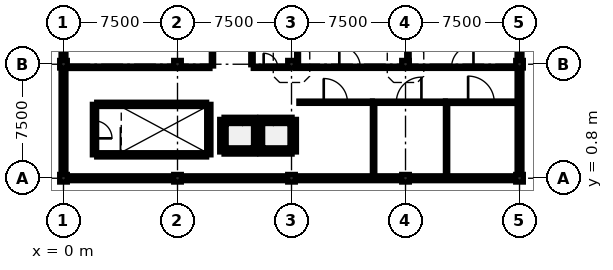
"""IFC4 building model, lengths in metres.
Left out: names, types, materials, properties, quantities, classifications, styles, units other than length and angle.
Written with IfcOpenShell. Run it as: python <this file> out.ifc"""

import sys

from ifc_helpers import new_model, si_unit, direction, frame, frame_2d, origin, origin_2d, place, context, subcontext, project, spatial, rectangle, extrude, element, fill, save


model = new_model("IFC4")
c1 = context("Model", 3, precision=1e-05, world=origin(), true_north=direction((0.0, 1.0)))
c2 = subcontext(c1, "Body", "Model", "MODEL_VIEW")
j1 = project(units=[si_unit("LENGTHUNIT", "METRE"), si_unit("PLANEANGLEUNIT", "RADIAN")], contexts=[c1])
p1 = place(None, origin())
s1 = spatial("IfcSite", under=j1, at=p1, CompositionType="ELEMENT")
p2 = place(p1, origin())
s2 = spatial("IfcBuilding", under=s1, at=p2, CompositionType="ELEMENT")
p3 = place(p2, frame((0.0, 0.0, 21.5)))
s3 = spatial("IfcBuildingStorey", under=s2, at=p3, CompositionType="ELEMENT", Elevation=21.5)
for number, where, z_axis, x_axis in (
    (1, (0.0, 0.8, 0.0), (0.0, 0.0, 1.0), (1.0, 0.0, 0.0)),
    (2, (0.0, 8.3, 0.0), (0.0, 0.0, 1.0), (1.0, 0.0, 0.0)),
):
    element("IfcColumn", number, at=place(p3, frame(where, z_axis=z_axis, x_axis=x_axis)), inside=s3, PredefinedType="COLUMN", context=c2, shape_type="SweptSolid", body=[
        extrude(rectangle(XDim=0.5, YDim=0.5, at=origin_2d()), origin(), (0.0, 0.0, 1.0), 3.83),
    ])
for number, where, z_axis, x_axis in (
    (3, (7.5, 0.8, 0.0), (0.0, 0.0, 1.0), (1.0, 0.0, 0.0)),
    (4, (7.5, 8.3, 0.0), (0.0, 0.0, 1.0), (1.0, 0.0, 0.0)),
):
    element("IfcColumn", number, at=place(p3, frame(where, z_axis=z_axis, x_axis=x_axis)), inside=s3, PredefinedType="COLUMN", context=c2, shape_type="SweptSolid", body=[
        extrude(rectangle(XDim=0.5, YDim=0.5, at=origin_2d()), origin(), (0.0, 0.0, 1.0), 4.08),
    ])
for number, where, z_axis, x_axis in (
    (5, (15.0, 0.8, 0.0), (0.0, 0.0, 1.0), (1.0, 0.0, 0.0)),
    (6, (15.0, 8.3, 0.0), (0.0, 0.0, 1.0), (1.0, 0.0, 0.0)),
):
    element("IfcColumn", number, at=place(p3, frame(where, z_axis=z_axis, x_axis=x_axis)), inside=s3, PredefinedType="COLUMN", context=c2, shape_type="SweptSolid", body=[
        extrude(rectangle(XDim=0.5, YDim=0.5, at=origin_2d()), origin(), (0.0, 0.0, 1.0), 4.33),
    ])
for number, where, z_axis, x_axis in (
    (7, (22.5, 0.8, 0.0), (0.0, 0.0, 1.0), (1.0, 0.0, 0.0)),
    (8, (22.5, 8.3, 0.0), (0.0, 0.0, 1.0), (1.0, 0.0, 0.0)),
):
    element("IfcColumn", number, at=place(p3, frame(where, z_axis=z_axis, x_axis=x_axis)), inside=s3, PredefinedType="COLUMN", context=c2, shape_type="SweptSolid", body=[
        extrude(rectangle(XDim=0.5, YDim=0.5, at=origin_2d()), origin(), (0.0, 0.0, 1.0), 4.58),
    ])
for number, where, z_axis, x_axis in (
    (9, (30.0, 0.8, 0.0), (0.0, 0.0, 1.0), (1.0, 0.0, 0.0)),
    (10, (30.0, 8.3, 0.0), (0.0, 0.0, 1.0), (1.0, 0.0, 0.0)),
):
    element("IfcColumn", number, at=place(p3, frame(where, z_axis=z_axis, x_axis=x_axis)), inside=s3, PredefinedType="COLUMN", context=c2, shape_type="SweptSolid", body=[
        extrude(rectangle(XDim=0.5, YDim=0.5, at=origin_2d()), origin(), (0.0, 0.0, 1.0), 4.83),
    ])
p4 = place(p3, frame((30.0, 15.55, 0.0), z_axis=(0.0, 0.0, 1.0), x_axis=(0.0, -1.0, 0.0)))
e11 = element("IfcWall", 11, at=p4, inside=s3, PredefinedType="SOLIDWALL", context=c2, shape_type="SweptSolid", body=[
    extrude(rectangle(XDim=7.0, YDim=0.32, at=frame_2d((3.5, 0.0))), origin(), (0.0, 0.0, 1.0), 3.7),
])
p5 = place(p4, frame((2.8, 0.0, 0.9)))
e12 = element("IfcOpeningElement", 12, at=p5, cuts=e11, PredefinedType="OPENING", context=c2, shape_type="SweptSolid", body=[
    extrude(rectangle(XDim=1.4, YDim=1.5, at=frame_2d((0.7, 0.75))), frame((0.0, 0.172, 0.0), z_axis=(0.0, -1.0, 0.0), x_axis=(1.0, 0.0, 0.0)), (0.0, 0.0, 1.0), 0.344),
])
for number, where, z_axis, x_axis in (
    (13, (30.0, 8.05, 0.0), (0.0, 0.0, 1.0), (0.0, -1.0, 0.0)),
    (14, (29.75, 0.8, 0.0), (0.0, 0.0, 1.0), (-1.0, 0.0, 0.0)),
    (15, (22.25, 0.8, 0.0), (0.0, 0.0, 1.0), (-1.0, 0.0, 0.0)),
):
    element("IfcWall", number, at=place(p3, frame(where, z_axis=z_axis, x_axis=x_axis)), inside=s3, PredefinedType="SOLIDWALL", context=c2, shape_type="SweptSolid", body=[
        extrude(rectangle(XDim=7.0, YDim=0.32, at=frame_2d((3.5, 0.0))), origin(), (0.0, 0.0, 1.0), 3.7),
    ])
p6 = place(p3, frame((14.75, 0.8, 0.0), z_axis=(0.0, 0.0, 1.0), x_axis=(-1.0, 0.0, 0.0)))
e16 = element("IfcWall", 16, at=p6, inside=s3, PredefinedType="SOLIDWALL", context=c2, shape_type="SweptSolid", body=[
    extrude(rectangle(XDim=7.0, YDim=0.32, at=frame_2d((3.5, 0.0))), origin(), (0.0, 0.0, 1.0), 3.7),
])
p7 = place(p6, frame((2.8, 0.0, 0.9)))
e17 = element("IfcOpeningElement", 17, at=p7, cuts=e16, PredefinedType="OPENING", context=c2, shape_type="SweptSolid", body=[
    extrude(rectangle(XDim=1.4, YDim=1.7, at=frame_2d((0.7, 0.85))), frame((0.0, 0.172, 0.0), z_axis=(0.0, -1.0, 0.0), x_axis=(1.0, 0.0, 0.0)), (0.0, 0.0, 1.0), 0.344),
])
p8 = place(p3, frame((7.25, 0.8, 0.0), z_axis=(0.0, 0.0, 1.0), x_axis=(-1.0, 0.0, 0.0)))
e18 = element("IfcWall", 18, at=p8, inside=s3, PredefinedType="SOLIDWALL", context=c2, shape_type="SweptSolid", body=[
    extrude(rectangle(XDim=7.0, YDim=0.32, at=frame_2d((3.5, 0.0))), origin(), (0.0, 0.0, 1.0), 3.7),
])
p9 = place(p8, frame((2.8, 0.0, 0.9)))
e19 = element("IfcOpeningElement", 19, at=p9, cuts=e18, PredefinedType="OPENING", context=c2, shape_type="SweptSolid", body=[
    extrude(rectangle(XDim=1.4, YDim=1.9, at=frame_2d((0.7, 0.95))), frame((0.0, 0.172, 0.0), z_axis=(0.0, -1.0, 0.0), x_axis=(1.0, 0.0, 0.0)), (0.0, 0.0, 1.0), 0.344),
])
for number, where, z_axis, x_axis in (
    (20, (0.0, 1.05, 0.0), (0.0, 0.0, 1.0), (0.0, 1.0, 0.0)),
    (21, (0.0, 8.55, 0.0), (0.0, 0.0, 1.0), (0.0, 1.0, 0.0)),
):
    element("IfcWall", number, at=place(p3, frame(where, z_axis=z_axis, x_axis=x_axis)), inside=s3, PredefinedType="SOLIDWALL", context=c2, shape_type="SweptSolid", body=[
        extrude(rectangle(XDim=7.0, YDim=0.32, at=frame_2d((3.5, 0.0))), origin(), (0.0, 0.0, 1.0), 3.7),
    ])
p10 = place(p3, frame((2.185, 2.34, 0.0), z_axis=(0.0, 0.0, 1.0), x_axis=(1.0, 0.0, 0.0)))
e22 = element("IfcWall", 22, at=p10, inside=s3, PredefinedType="SHEAR", context=c2, shape_type="SweptSolid", body=[
    extrude(rectangle(XDim=7.23, YDim=0.28, at=frame_2d((3.615, 0.0))), origin(), (0.0, 0.0, 1.0), 3.72),
])
p11 = place(p3, frame((9.56, 2.34, 0.0), z_axis=(0.0, 0.0, 1.0), x_axis=(0.0, 1.0, 0.0)))
e23 = element("IfcWall", 23, at=p11, inside=s3, PredefinedType="SHEAR", context=c2, shape_type="SweptSolid", body=[
    extrude(rectangle(XDim=3.32, YDim=0.28, at=frame_2d((1.66, 0.0))), origin(), (0.0, 0.0, 1.0), 3.72),
])
p12 = place(p3, frame((9.415, 5.66, 0.0), z_axis=(0.0, 0.0, 1.0), x_axis=(-1.0, 0.0, 0.0)))
e24 = element("IfcWall", 24, at=p12, inside=s3, PredefinedType="SHEAR", context=c2, shape_type="SweptSolid", body=[
    extrude(rectangle(XDim=7.23, YDim=0.28, at=frame_2d((3.615, 0.0))), origin(), (0.0, 0.0, 1.0), 3.72),
])
p13 = place(p3, frame((2.04, 5.66, 0.0), z_axis=(0.0, 0.0, 1.0), x_axis=(0.0, -1.0, 0.0)))
e25 = element("IfcWall", 25, at=p13, inside=s3, PredefinedType="SHEAR", context=c2, shape_type="SweptSolid", body=[
    extrude(rectangle(XDim=3.32, YDim=0.28, at=frame_2d((1.66, 0.0))), origin(), (0.0, 0.0, 1.0), 3.72),
])
p14 = place(p13, frame((1.085, 0.0, 0.0)))
e26 = element("IfcOpeningElement", 26, at=p14, cuts=e25, PredefinedType="OPENING", context=c2, shape_type="SweptSolid", body=[
    extrude(rectangle(XDim=1.15, YDim=2.15, at=frame_2d((0.575, 1.075))), frame((0.0, 0.152, 0.0), z_axis=(0.0, -1.0, 0.0), x_axis=(1.0, 0.0, 0.0)), (0.0, 0.0, 1.0), 0.304),
])
p15 = place(p3, frame((10.562, 2.529, 0.0), z_axis=(0.0, 0.0, 1.0), x_axis=(1.0, 0.0, 0.0)))
e27 = element("IfcWall", 27, at=p15, inside=s3, PredefinedType="SHEAR", context=c2, shape_type="SweptSolid", body=[
    extrude(rectangle(XDim=2.077, YDim=0.28, at=frame_2d((1.039, 0.0))), origin(), (0.0, 0.0, 1.0), 5.3),
])
p16 = place(p3, frame((12.783, 2.529, 0.0), z_axis=(0.0, 0.0, 1.0), x_axis=(0.0, 1.0, 0.0)))
e28 = element("IfcWall", 28, at=p16, inside=s3, PredefinedType="SHEAR", context=c2, shape_type="SweptSolid", body=[
    extrude(rectangle(XDim=2.141, YDim=0.28, at=frame_2d((1.071, 0.0))), origin(), (0.0, 0.0, 1.0), 5.3),
])
p17 = place(p3, frame((12.638, 4.671, 0.0), z_axis=(0.0, 0.0, 1.0), x_axis=(-1.0, 0.0, 0.0)))
e29 = element("IfcWall", 29, at=p17, inside=s3, PredefinedType="SHEAR", context=c2, shape_type="SweptSolid", body=[
    extrude(rectangle(XDim=2.077, YDim=0.28, at=frame_2d((1.039, 0.0))), origin(), (0.0, 0.0, 1.0), 5.3),
])
p18 = place(p17, frame((0.489, 0.0, 0.0)))
e30 = element("IfcOpeningElement", 30, at=p18, cuts=e29, PredefinedType="OPENING", context=c2, shape_type="SweptSolid", body=[
    extrude(rectangle(XDim=1.1, YDim=2.15, at=frame_2d((0.55, 1.075))), frame((0.0, 0.152, 0.0), z_axis=(0.0, -1.0, 0.0), x_axis=(1.0, 0.0, 0.0)), (0.0, 0.0, 1.0), 0.304),
])
p19 = place(p3, frame((10.417, 4.671, 0.0), z_axis=(0.0, 0.0, 1.0), x_axis=(0.0, -1.0, 0.0)))
e31 = element("IfcWall", 31, at=p19, inside=s3, PredefinedType="SHEAR", context=c2, shape_type="SweptSolid", body=[
    extrude(rectangle(XDim=2.141, YDim=0.28, at=frame_2d((1.071, 0.0))), origin(), (0.0, 0.0, 1.0), 5.3),
])
p20 = place(p3, frame((12.928, 2.529, 0.0), z_axis=(0.0, 0.0, 1.0), x_axis=(1.0, 0.0, 0.0)))
e32 = element("IfcWall", 32, at=p20, inside=s3, PredefinedType="SHEAR", context=c2, shape_type="SweptSolid", body=[
    extrude(rectangle(XDim=2.11, YDim=0.28, at=frame_2d((1.055, 0.0))), origin(), (0.0, 0.0, 1.0), 5.3),
])
p21 = place(p3, frame((15.184, 2.529, 0.0), z_axis=(0.0, 0.0, 1.0), x_axis=(0.0, 1.0, 0.0)))
e33 = element("IfcWall", 33, at=p21, inside=s3, PredefinedType="SHEAR", context=c2, shape_type="SweptSolid", body=[
    extrude(rectangle(XDim=2.141, YDim=0.28, at=frame_2d((1.071, 0.0))), origin(), (0.0, 0.0, 1.0), 5.3),
])
p22 = place(p3, frame((15.039, 4.671, 0.0), z_axis=(0.0, 0.0, 1.0), x_axis=(-1.0, 0.0, 0.0)))
e34 = element("IfcWall", 34, at=p22, inside=s3, PredefinedType="SHEAR", context=c2, shape_type="SweptSolid", body=[
    extrude(rectangle(XDim=2.11, YDim=0.28, at=frame_2d((1.055, 0.0))), origin(), (0.0, 0.0, 1.0), 5.3),
])
p23 = place(p22, frame((0.505, 0.0, 0.0)))
e35 = element("IfcOpeningElement", 35, at=p23, cuts=e34, PredefinedType="OPENING", context=c2, shape_type="SweptSolid", body=[
    extrude(rectangle(XDim=1.1, YDim=2.15, at=frame_2d((0.55, 1.075))), frame((0.0, 0.152, 0.0), z_axis=(0.0, -1.0, 0.0), x_axis=(1.0, 0.0, 0.0)), (0.0, 0.0, 1.0), 0.304),
])
p24 = place(p3, frame((15.485, 5.8, 0.0), z_axis=(0.0, 0.0, 1.0), x_axis=(1.0, 0.0, 0.0)))
e36 = element("IfcWall", 36, at=p24, inside=s3, PredefinedType="PARTITIONING", context=c2, shape_type="SweptSolid", body=[
    extrude(rectangle(XDim=4.83, YDim=0.15, at=frame_2d((2.415, 0.0))), origin(), (0.0, 0.0, 1.0), 3.7),
])
p25 = place(p24, frame((1.635, 0.0, 0.0)))
e37 = element("IfcOpeningElement", 37, at=p25, cuts=e36, PredefinedType="OPENING", context=c2, shape_type="SweptSolid", body=[
    extrude(rectangle(XDim=1.56, YDim=2.3, at=frame_2d((0.78, 1.15))), frame((0.0, 0.087, 0.0), z_axis=(0.0, -1.0, 0.0), x_axis=(1.0, 0.0, 0.0)), (0.0, 0.0, 1.0), 0.174),
])
p26 = place(p3, frame((20.327, 5.8, 0.0), z_axis=(0.0, 0.0, 1.0), x_axis=(1.0, 0.0, 0.0)))
e38 = element("IfcWall", 38, at=p26, inside=s3, PredefinedType="PARTITIONING", context=c2, shape_type="SweptSolid", body=[
    extrude(rectangle(XDim=4.788, YDim=0.15, at=frame_2d((2.394, 0.0))), origin(), (0.0, 0.0, 1.0), 3.7),
])
p27 = place(p26, frame((1.569, 0.0, 0.0)))
e39 = element("IfcOpeningElement", 39, at=p27, cuts=e38, PredefinedType="OPENING", context=c2, shape_type="SweptSolid", body=[
    extrude(rectangle(XDim=1.65, YDim=2.32, at=frame_2d((0.825, 1.16))), frame((0.0, 0.087, 0.0), z_axis=(0.0, -1.0, 0.0), x_axis=(1.0, 0.0, 0.0)), (0.0, 0.0, 1.0), 0.174),
])
p28 = place(p3, frame((25.127, 5.8, 0.0), z_axis=(0.0, 0.0, 1.0), x_axis=(1.0, 0.0, 0.0)))
e40 = element("IfcWall", 40, at=p28, inside=s3, PredefinedType="PARTITIONING", context=c2, shape_type="SweptSolid", body=[
    extrude(rectangle(XDim=4.701, YDim=0.16, at=frame_2d((2.351, 0.0))), origin(), (0.0, 0.0, 1.0), 3.7),
])
p29 = place(p28, frame((1.49, 0.0, 0.0)))
e41 = element("IfcOpeningElement", 41, at=p29, cuts=e40, PredefinedType="OPENING", context=c2, shape_type="SweptSolid", body=[
    extrude(rectangle(XDim=1.72, YDim=2.34, at=frame_2d((0.86, 1.17))), frame((0.0, 0.092, 0.0), z_axis=(0.0, -1.0, 0.0), x_axis=(1.0, 0.0, 0.0)), (0.0, 0.0, 1.0), 0.184),
])
p30 = place(p3, frame((15.262, 8.1, 0.0), z_axis=(0.0, 0.0, 1.0), x_axis=(1.0, 0.0, 0.0)))
e42 = element("IfcWall", 42, at=p30, inside=s3, PredefinedType="PARTITIONING", context=c2, shape_type="SweptSolid", body=[
    extrude(rectangle(XDim=7.146, YDim=0.15, at=frame_2d((3.573, 0.0))), origin(), (0.0, 0.0, 1.0), 3.7),
])
p31 = place(p30, frame((2.883, 0.0, 0.0)))
e43 = element("IfcOpeningElement", 43, at=p31, cuts=e42, PredefinedType="OPENING", context=c2, shape_type="SweptSolid", body=[
    extrude(rectangle(XDim=1.38, YDim=2.3, at=frame_2d((0.69, 1.15))), frame((0.0, 0.087, 0.0), z_axis=(0.0, -1.0, 0.0), x_axis=(1.0, 0.0, 0.0)), (0.0, 0.0, 1.0), 0.174),
])
p32 = place(p3, frame((22.762, 8.1, 0.0), z_axis=(0.0, 0.0, 1.0), x_axis=(1.0, 0.0, 0.0)))
e44 = element("IfcWall", 44, at=p32, inside=s3, PredefinedType="PARTITIONING", context=c2, shape_type="SweptSolid", body=[
    extrude(rectangle(XDim=6.976, YDim=0.15, at=frame_2d((3.488, 0.0))), origin(), (0.0, 0.0, 1.0), 3.7),
])
p33 = place(p32, frame((2.768, 0.0, 0.0)))
e45 = element("IfcOpeningElement", 45, at=p33, cuts=e44, PredefinedType="OPENING", context=c2, shape_type="SweptSolid", body=[
    extrude(rectangle(XDim=1.44, YDim=2.32, at=frame_2d((0.72, 1.16))), frame((0.0, 0.087, 0.0), z_axis=(0.0, -1.0, 0.0), x_axis=(1.0, 0.0, 0.0)), (0.0, 0.0, 1.0), 0.174),
])
p34 = place(p3, frame((9.8, 8.185, 0.0), z_axis=(0.0, 0.0, 1.0), x_axis=(0.0, 1.0, 0.0)))
e46 = element("IfcWall", 46, at=p34, inside=s3, PredefinedType="PARTITIONING", context=c2, shape_type="SweptSolid", body=[
    extrude(rectangle(XDim=6.93, YDim=0.15, at=frame_2d((3.465, 0.0))), origin(), (0.0, 0.0, 1.0), 3.7),
])
p35 = place(p34, frame((2.865, 0.0, 0.0)))
e47 = element("IfcOpeningElement", 47, at=p35, cuts=e46, PredefinedType="OPENING", context=c2, shape_type="SweptSolid", body=[
    extrude(rectangle(XDim=1.2, YDim=2.15, at=frame_2d((0.6, 1.075))), frame((0.0, 0.087, 0.0), z_axis=(0.0, -1.0, 0.0), x_axis=(1.0, 0.0, 0.0)), (0.0, 0.0, 1.0), 0.174),
])
p36 = place(p3, frame((12.485, 8.1, 0.0), z_axis=(0.0, 0.0, 1.0), x_axis=(1.0, 0.0, 0.0)))
e48 = element("IfcWall", 48, at=p36, inside=s3, PredefinedType="PARTITIONING", context=c2, shape_type="SweptSolid", body=[
    extrude(rectangle(XDim=2.285, YDim=0.15, at=frame_2d((1.143, 0.0))), origin(), (0.0, 0.0, 1.0), 3.7),
])
p37 = place(p36, frame((0.683, 0.0, 0.0)))
e49 = element("IfcOpeningElement", 49, at=p37, cuts=e48, PredefinedType="OPENING", context=c2, shape_type="SweptSolid", body=[
    extrude(rectangle(XDim=0.92, YDim=2.1, at=frame_2d((0.46, 1.05))), frame((0.0, 0.087, 0.0), z_axis=(0.0, -1.0, 0.0), x_axis=(1.0, 0.0, 0.0)), (0.0, 0.0, 1.0), 0.174),
])
p38 = place(p3, frame((20.4, 0.972, 0.0), z_axis=(0.0, 0.0, 1.0), x_axis=(0.0, 1.0, 0.0)))
e50 = element("IfcWall", 50, at=p38, inside=s3, PredefinedType="PARTITIONING", context=c2, shape_type="SweptSolid", body=[
    extrude(rectangle(XDim=4.741, YDim=0.16, at=frame_2d((2.371, 0.0))), origin(), (0.0, 0.0, 1.0), 3.7),
])
p39 = place(p3, frame((25.2, 0.972, 0.0), z_axis=(0.0, 0.0, 1.0), x_axis=(0.0, 1.0, 0.0)))
e51 = element("IfcWall", 51, at=p39, inside=s3, PredefinedType="PARTITIONING", context=c2, shape_type="SweptSolid", body=[
    extrude(rectangle(XDim=4.736, YDim=0.15, at=frame_2d((2.368, 0.0))), origin(), (0.0, 0.0, 1.0), 3.7),
])
p40 = place(p3, frame((15.4, 8.187, 0.0), z_axis=(0.0, 0.0, 1.0), x_axis=(0.0, 1.0, 0.0)))
e52 = element("IfcWall", 52, at=p40, inside=s3, PredefinedType="PARTITIONING", context=c2, shape_type="SweptSolid", body=[
    extrude(rectangle(XDim=7.441, YDim=0.125, at=frame_2d((3.72, 0.0))), origin(), (0.0, 0.0, 1.0), 3.7),
])
p41 = place(p3, frame((22.66, 8.432, 0.0), z_axis=(0.0, 0.0, 1.0), x_axis=(0.0, 1.0, 0.0)))
e53 = element("IfcWall", 53, at=p41, inside=s3, PredefinedType="PARTITIONING", context=c2, shape_type="SweptSolid", body=[
    extrude(rectangle(XDim=7.106, YDim=0.16, at=frame_2d((3.553, 0.0))), origin(), (0.0, 0.0, 1.0), 3.7),
])
p42 = place(p3, frame((0.262, 8.1, 0.0), z_axis=(0.0, 0.0, 1.0), x_axis=(1.0, 0.0, 0.0)))
e54 = element("IfcWall", 54, at=p42, inside=s3, PredefinedType="PARTITIONING", context=c2, shape_type="SweptSolid", body=[
    extrude(rectangle(XDim=9.373, YDim=0.16, at=frame_2d((4.687, 0.0))), origin(), (0.0, 0.0, 1.0), 3.7),
])
p43 = place(p3, frame((12.4, 8.265, 0.0), z_axis=(0.0, 0.0, 1.0), x_axis=(0.0, 1.0, 0.0)))
e55 = element("IfcWall", 55, at=p43, inside=s3, PredefinedType="PARTITIONING", context=c2, shape_type="SweptSolid", body=[
    extrude(rectangle(XDim=7.17, YDim=0.16, at=frame_2d((3.585, 0.0))), origin(), (0.0, 0.0, 1.0), 3.7),
])
p44 = place(p7, origin())
e56 = element("IfcWindow", 56, at=p44, inside=s3, PartitioningType="SINGLE_PANEL", PredefinedType="WINDOW", context=c2, shape_type="SweptSolid", body=[
    extrude(rectangle(XDim=1.4, YDim=1.7, at=frame_2d((0.7, 0.85))), frame((0.0, 0.03, 0.0), z_axis=(0.0, -1.0, 0.0), x_axis=(1.0, 0.0, 0.0)), (0.0, 0.0, 1.0), 0.06),
])
fill(e17, e56)
p45 = place(p9, origin())
e57 = element("IfcWindow", 57, at=p45, inside=s3, PartitioningType="SINGLE_PANEL", PredefinedType="WINDOW", context=c2, shape_type="SweptSolid", body=[
    extrude(rectangle(XDim=1.4, YDim=1.9, at=frame_2d((0.7, 0.95))), frame((0.0, 0.03, 0.0), z_axis=(0.0, -1.0, 0.0), x_axis=(1.0, 0.0, 0.0)), (0.0, 0.0, 1.0), 0.06),
])
fill(e19, e57)
p46 = place(p14, origin())
e58 = element("IfcDoor", 58, at=p46, inside=s3, OperationType="SINGLE_SWING_RIGHT", PredefinedType="DOOR", context=c2, shape_type="SweptSolid", body=[
    extrude(rectangle(XDim=1.15, YDim=2.15, at=frame_2d((0.575, 1.075))), frame((0.0, 0.025, 0.0), z_axis=(0.0, -1.0, 0.0), x_axis=(1.0, 0.0, 0.0)), (0.0, 0.0, 1.0), 0.05),
])
fill(e26, e58)
p47 = place(p18, origin())
e59 = element("IfcDoor", 59, at=p47, inside=s3, OperationType="SLIDING_TO_LEFT", PredefinedType="DOOR", context=c2, shape_type="SweptSolid", body=[
    extrude(rectangle(XDim=1.1, YDim=2.15, at=frame_2d((0.55, 1.075))), frame((0.0, 0.025, 0.0), z_axis=(0.0, -1.0, 0.0), x_axis=(1.0, 0.0, 0.0)), (0.0, 0.0, 1.0), 0.05),
])
fill(e30, e59)
p48 = place(p23, origin())
e60 = element("IfcDoor", 60, at=p48, inside=s3, OperationType="SLIDING_TO_RIGHT", PredefinedType="DOOR", context=c2, shape_type="SweptSolid", body=[
    extrude(rectangle(XDim=1.1, YDim=2.15, at=frame_2d((0.55, 1.075))), frame((0.0, 0.025, 0.0), z_axis=(0.0, -1.0, 0.0), x_axis=(1.0, 0.0, 0.0)), (0.0, 0.0, 1.0), 0.05),
])
fill(e35, e60)
p49 = place(p25, origin())
e61 = element("IfcDoor", 61, at=p49, inside=s3, OperationType="SINGLE_SWING_LEFT", PredefinedType="DOOR", context=c2, shape_type="SweptSolid", body=[
    extrude(rectangle(XDim=1.56, YDim=2.3, at=frame_2d((0.78, 1.15))), frame((0.0, 0.025, 0.0), z_axis=(0.0, -1.0, 0.0), x_axis=(1.0, 0.0, 0.0)), (0.0, 0.0, 1.0), 0.05),
])
fill(e37, e61)
p50 = place(p27, origin())
e62 = element("IfcDoor", 62, at=p50, inside=s3, OperationType="SINGLE_SWING_RIGHT", PredefinedType="DOOR", context=c2, shape_type="SweptSolid", body=[
    extrude(rectangle(XDim=1.65, YDim=2.32, at=frame_2d((0.825, 1.16))), frame((0.0, 0.025, 0.0), z_axis=(0.0, -1.0, 0.0), x_axis=(1.0, 0.0, 0.0)), (0.0, 0.0, 1.0), 0.05),
])
fill(e39, e62)
p51 = place(p29, origin())
e63 = element("IfcDoor", 63, at=p51, inside=s3, OperationType="SINGLE_SWING_LEFT", PredefinedType="DOOR", context=c2, shape_type="SweptSolid", body=[
    extrude(rectangle(XDim=1.72, YDim=2.34, at=frame_2d((0.86, 1.17))), frame((0.0, 0.025, 0.0), z_axis=(0.0, -1.0, 0.0), x_axis=(1.0, 0.0, 0.0)), (0.0, 0.0, 1.0), 0.05),
])
fill(e41, e63)
p52 = place(p31, origin())
e64 = element("IfcDoor", 64, at=p52, inside=s3, OperationType="SINGLE_SWING_LEFT", PredefinedType="DOOR", context=c2, shape_type="SweptSolid", body=[
    extrude(rectangle(XDim=1.38, YDim=2.3, at=frame_2d((0.69, 1.15))), frame((0.0, 0.025, 0.0), z_axis=(0.0, -1.0, 0.0), x_axis=(1.0, 0.0, 0.0)), (0.0, 0.0, 1.0), 0.05),
])
fill(e43, e64)
p53 = place(p33, origin())
e65 = element("IfcDoor", 65, at=p53, inside=s3, OperationType="SINGLE_SWING_RIGHT", PredefinedType="DOOR", context=c2, shape_type="SweptSolid", body=[
    extrude(rectangle(XDim=1.44, YDim=2.32, at=frame_2d((0.72, 1.16))), frame((0.0, 0.025, 0.0), z_axis=(0.0, -1.0, 0.0), x_axis=(1.0, 0.0, 0.0)), (0.0, 0.0, 1.0), 0.05),
])
fill(e45, e65)
p54 = place(p37, origin())
e66 = element("IfcDoor", 66, at=p54, inside=s3, OperationType="SINGLE_SWING_LEFT", PredefinedType="DOOR", context=c2, shape_type="SweptSolid", body=[
    extrude(rectangle(XDim=0.92, YDim=2.1, at=frame_2d((0.46, 1.05))), frame((0.0, 0.025, 0.0), z_axis=(0.0, -1.0, 0.0), x_axis=(1.0, 0.0, 0.0)), (0.0, 0.0, 1.0), 0.05),
])
fill(e49, e66)
save(model, sys.argv[1])
